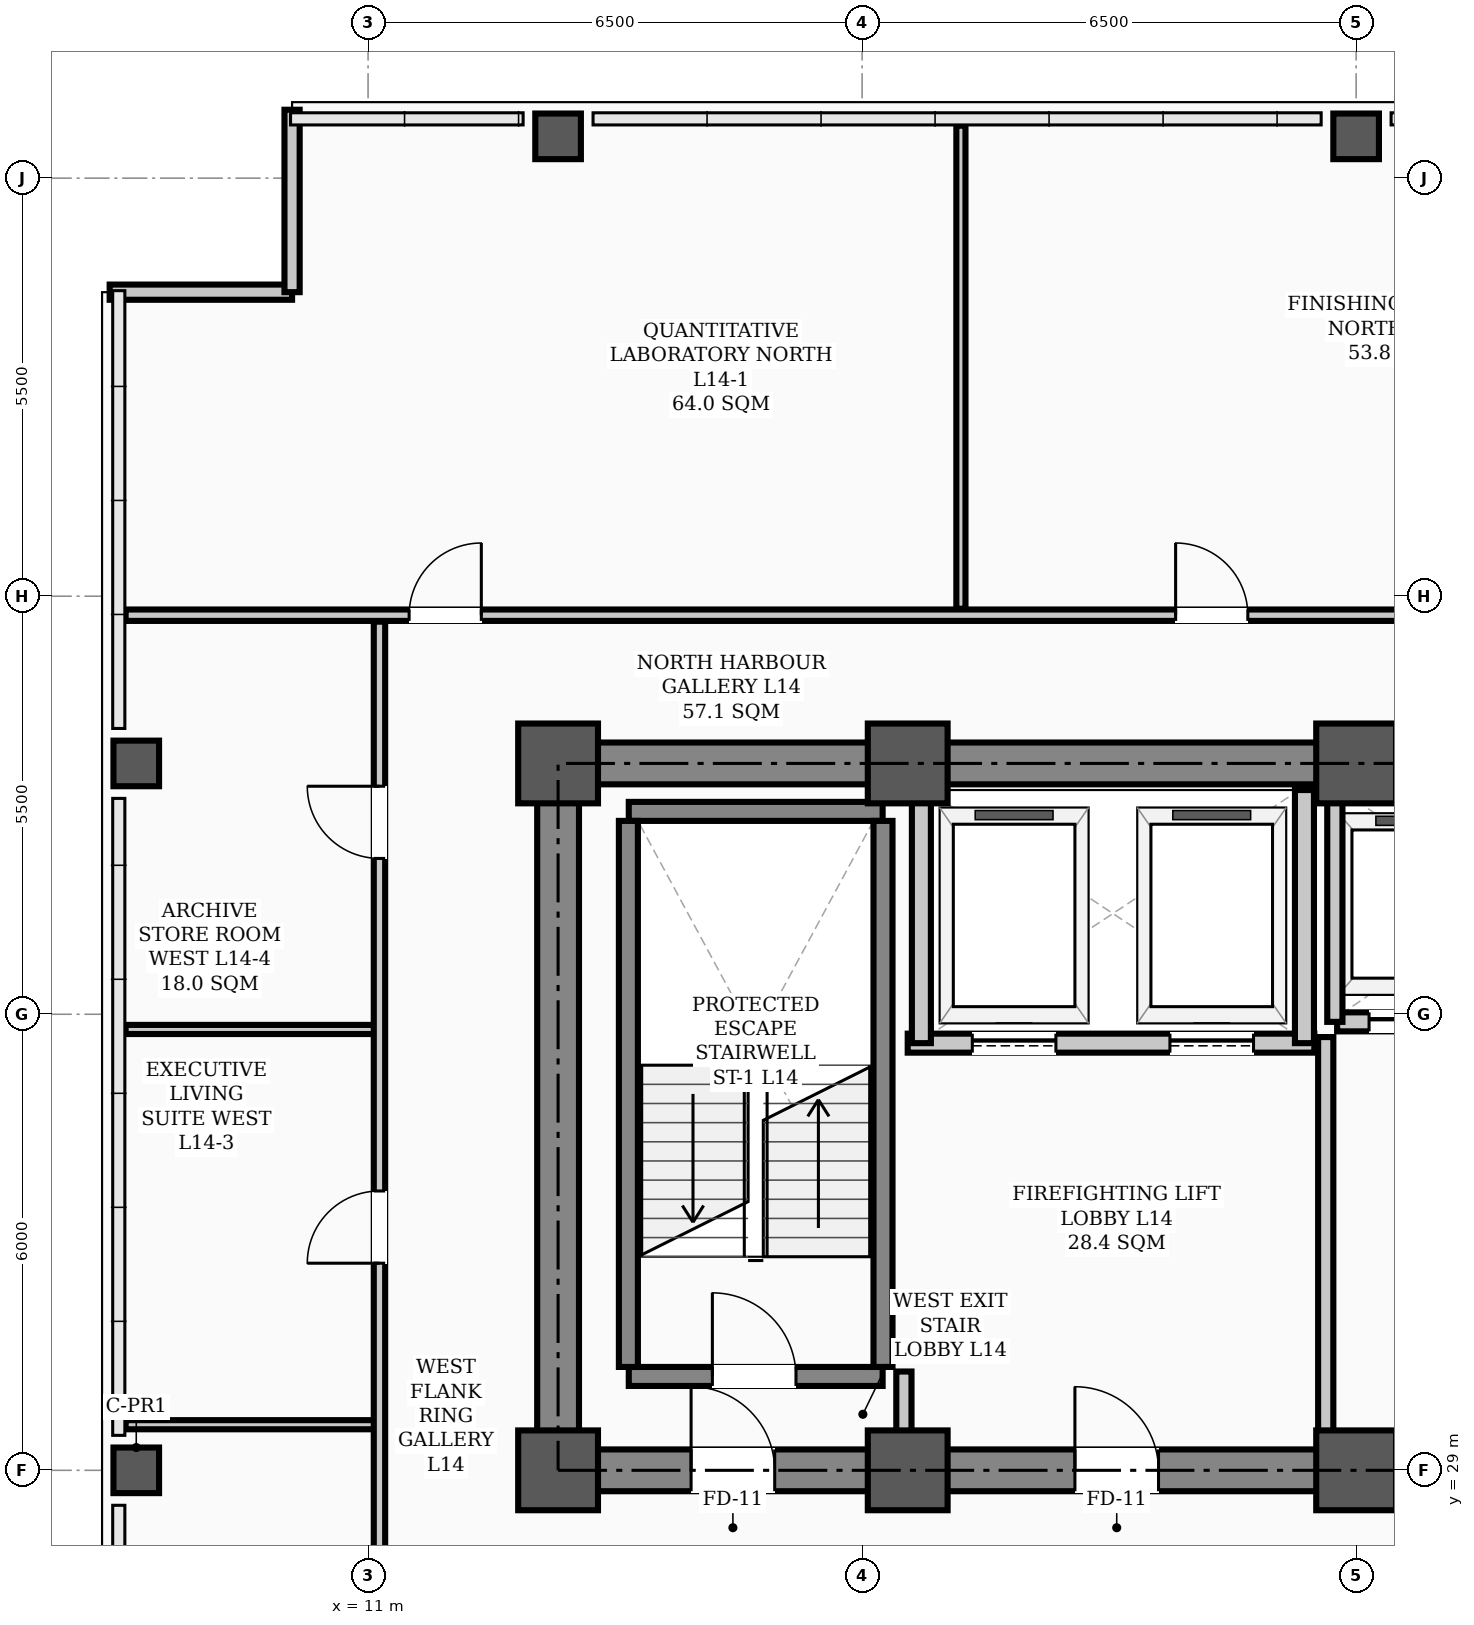
"""IFC4 building model, lengths in metres.
Left out: names, types, materials, properties, quantities, classifications, styles, units other than length and angle.
Written with IfcOpenShell. Run it as: python <this file> out.ifc"""

import sys

from ifc_helpers import new_model, si_unit, direction, frame, frame_2d, origin, origin_2d, place, context, subcontext, project, spatial, rectangle, hollow_rectangle, extrude, element, fill, save


model = new_model("IFC4")
c1 = context("Model", 3, precision=1e-05, world=origin(), true_north=direction((0.0, 1.0)))
c2 = subcontext(c1, "Body", "Model", "MODEL_VIEW")
j1 = project(units=[si_unit("LENGTHUNIT", "METRE"), si_unit("PLANEANGLEUNIT", "RADIAN")], contexts=[c1])
p1 = place(None, origin())
s1 = spatial("IfcSite", under=j1, at=p1, CompositionType="ELEMENT")
p2 = place(p1, origin())
s2 = spatial("IfcBuilding", under=s1, at=p2, CompositionType="ELEMENT")
p3 = place(p2, frame((0.0, 0.0, 57.7)))
s3 = spatial("IfcBuildingStorey", under=s2, at=p3, CompositionType="ELEMENT", Elevation=57.7)
for number, where, z_axis, x_axis in (
    (1, (13.5, 29.0, 0.0), (0.0, 0.0, 1.0), (1.0, 0.0, 0.0)),
    (2, (13.5, 38.3, 0.0), (0.0, 0.0, 1.0), (1.0, 0.0, 0.0)),
    (3, (18.1, 29.0, 0.0), (0.0, 0.0, 1.0), (1.0, 0.0, 0.0)),
    (4, (18.1, 38.3, 0.0), (0.0, 0.0, 1.0), (1.0, 0.0, 0.0)),
    (5, (24.0, 29.0, 0.0), (0.0, 0.0, 1.0), (1.0, 0.0, 0.0)),
    (6, (24.0, 38.3, 0.0), (0.0, 0.0, 1.0), (1.0, 0.0, 0.0)),
):
    element("IfcColumn", number, at=place(p3, frame(where, z_axis=z_axis, x_axis=x_axis)), inside=s3, PredefinedType="COLUMN", context=c2, shape_type="SweptSolid", body=[
        extrude(hollow_rectangle(XDim=1.05, YDim=1.05, WallThickness=0.038, InnerFilletRadius=0.019, OuterFilletRadius=0.057, at=origin_2d()), origin(), (0.0, 0.0, 1.0), 3.9),
    ])
for number, where, z_axis, x_axis in (
    (7, (7.95, 29.0, 0.0), (0.0, 0.0, 1.0), (1.0, 0.0, 0.0)),
    (8, (7.95, 38.3, 0.0), (0.0, 0.0, 1.0), (1.0, 0.0, 0.0)),
    (9, (13.5, 46.55, 0.0), (0.0, 0.0, 1.0), (1.0, 0.0, 0.0)),
    (10, (24.0, 46.55, 0.0), (0.0, 0.0, 1.0), (1.0, 0.0, 0.0)),
):
    element("IfcColumn", number, at=place(p3, frame(where, z_axis=z_axis, x_axis=x_axis)), inside=s3, PredefinedType="COLUMN", context=c2, shape_type="SweptSolid", body=[
        extrude(hollow_rectangle(XDim=0.6, YDim=0.6, WallThickness=0.026, InnerFilletRadius=0.013, OuterFilletRadius=0.039, at=origin_2d()), origin(), (0.0, 0.0, 1.0), 3.9),
    ])
for number, where, z_axis, x_axis in (
    (11, (7.6, 44.5, 0.0), (0.0, 0.0, 1.0), (1.0, 0.0, 0.0)),
    (12, (10.0, 44.5, 0.0), (0.0, 0.0, 1.0), (0.0, 1.0, 0.0)),
):
    element("IfcWall", number, at=place(p3, frame(where, z_axis=z_axis, x_axis=x_axis)), inside=s3, PredefinedType="PARAPET", context=c2, shape_type="SweptSolid", body=[
        extrude(rectangle(XDim=2.4, YDim=0.2, at=frame_2d((1.2, 0.0))), origin(), (0.0, 0.0, 1.0), 1.2),
    ])
p4 = place(p3, frame((13.5, 29.0, 0.0), z_axis=(0.0, 0.0, 1.0), x_axis=(1.0, 0.0, 0.0)))
e13 = element("IfcWall", 13, at=p4, inside=s3, PredefinedType="SHEAR", context=c2, shape_type="SweptSolid", body=[
    extrude(rectangle(XDim=30.5, YDim=0.55, at=frame_2d((15.25, 0.0))), origin(), (0.0, 0.0, 1.0), 3.72),
])
p5 = place(p4, frame((1.75, 0.0, 0.0)))
e14 = element("IfcOpeningElement", 14, at=p5, cuts=e13, PredefinedType="OPENING", context=c2, shape_type="SweptSolid", body=[
    extrude(rectangle(XDim=1.1, YDim=2.08, at=frame_2d((0.55, 1.04))), frame((0.0, 0.285, 0.0), z_axis=(0.0, -1.0, 0.0), x_axis=(1.0, 0.0, 0.0)), (0.0, 0.0, 1.0), 0.57),
])
p6 = place(p4, frame((26.7, 0.0, 0.0)))
e15 = element("IfcOpeningElement", 15, at=p6, cuts=e13, PredefinedType="OPENING", context=c2, shape_type="SweptSolid", body=[
    extrude(rectangle(XDim=1.1, YDim=2.08, at=frame_2d((0.55, 1.04))), frame((0.0, 0.285, 0.0), z_axis=(0.0, -1.0, 0.0), x_axis=(1.0, 0.0, 0.0)), (0.0, 0.0, 1.0), 0.57),
])
p7 = place(p4, frame((6.8, 0.0, 0.0)))
e16 = element("IfcOpeningElement", 16, at=p7, cuts=e13, PredefinedType="OPENING", context=c2, shape_type="SweptSolid", body=[
    extrude(rectangle(XDim=1.1, YDim=2.08, at=frame_2d((0.55, 1.04))), frame((0.0, 0.285, 0.0), z_axis=(0.0, -1.0, 0.0), x_axis=(1.0, 0.0, 0.0)), (0.0, 0.0, 1.0), 0.57),
])
p8 = place(p4, frame((13.2, 0.0, 0.0)))
e17 = element("IfcOpeningElement", 17, at=p8, cuts=e13, PredefinedType="OPENING", context=c2, shape_type="SweptSolid", body=[
    extrude(rectangle(XDim=1.6, YDim=2.08, at=frame_2d((0.8, 1.04))), frame((0.0, 0.285, 0.0), z_axis=(0.0, -1.0, 0.0), x_axis=(1.0, 0.0, 0.0)), (0.0, 0.0, 1.0), 0.57),
])
p9 = place(p4, frame((20.525, 0.0, 0.0)))
e18 = element("IfcOpeningElement", 18, at=p9, cuts=e13, PredefinedType="OPENING", context=c2, shape_type="SweptSolid", body=[
    extrude(rectangle(XDim=0.95, YDim=2.08, at=frame_2d((0.475, 1.04))), frame((0.0, 0.285, 0.0), z_axis=(0.0, -1.0, 0.0), x_axis=(1.0, 0.0, 0.0)), (0.0, 0.0, 1.0), 0.57),
])
p10 = place(p3, frame((13.5, 38.3, 0.0), z_axis=(0.0, 0.0, 1.0), x_axis=(1.0, 0.0, 0.0)))
e19 = element("IfcWall", 19, at=p10, inside=s3, PredefinedType="SHEAR", context=c2, shape_type="SweptSolid", body=[
    extrude(rectangle(XDim=30.5, YDim=0.55, at=frame_2d((15.25, 0.0))), origin(), (0.0, 0.0, 1.0), 3.72),
])
p11 = place(p3, frame((13.5, 29.35, 0.0), z_axis=(0.0, 0.0, 1.0), x_axis=(0.0, 1.0, 0.0)))
e20 = element("IfcWall", 20, at=p11, inside=s3, PredefinedType="SHEAR", context=c2, shape_type="SweptSolid", body=[
    extrude(rectangle(XDim=8.6, YDim=0.55, at=frame_2d((4.3, 0.0))), origin(), (0.0, 0.0, 1.0), 3.72),
])
p12 = place(p3, frame((14.43, 30.235, 0.0), z_axis=(0.0, 0.0, 1.0), x_axis=(1.0, 0.0, 0.0)))
e21 = element("IfcWall", 21, at=p12, inside=s3, PredefinedType="STANDARD", context=c2, shape_type="SweptSolid", body=[
    extrude(rectangle(XDim=3.34, YDim=0.25, at=frame_2d((1.67, 0.0))), origin(), (0.0, 0.0, 1.0), 3.72),
])
p13 = place(p12, frame((1.1, 0.0, 0.0)))
e22 = element("IfcOpeningElement", 22, at=p13, cuts=e21, PredefinedType="OPENING", context=c2, shape_type="SweptSolid", body=[
    extrude(rectangle(XDim=1.1, YDim=2.08, at=frame_2d((0.55, 1.04))), frame((0.0, 0.135, 0.0), z_axis=(0.0, -1.0, 0.0), x_axis=(1.0, 0.0, 0.0)), (0.0, 0.0, 1.0), 0.27),
])
p14 = place(p3, frame((14.43, 37.669, 0.0), z_axis=(0.0, 0.0, 1.0), x_axis=(1.0, 0.0, 0.0)))
e23 = element("IfcWall", 23, at=p14, inside=s3, PredefinedType="STANDARD", context=c2, shape_type="SweptSolid", body=[
    extrude(rectangle(XDim=3.34, YDim=0.25, at=frame_2d((1.67, 0.0))), origin(), (0.0, 0.0, 1.0), 3.72),
])
for number, where, z_axis, x_axis in (
    (24, (14.425, 30.36, 0.0), (0.0, 0.0, 1.0), (0.0, 1.0, 0.0)),
    (25, (17.775, 30.36, 0.0), (0.0, 0.0, 1.0), (0.0, 1.0, 0.0)),
):
    element("IfcWall", number, at=place(p3, frame(where, z_axis=z_axis, x_axis=x_axis)), inside=s3, PredefinedType="STANDARD", context=c2, shape_type="SweptSolid", body=[
        extrude(rectangle(XDim=7.184, YDim=0.25, at=frame_2d((3.592, 0.0))), origin(), (0.0, 0.0, 1.0), 3.72),
    ])
p15 = place(p3, frame((18.1, 34.62, 0.0), z_axis=(0.0, 0.0, 1.0), x_axis=(1.0, 0.0, 0.0)))
e26 = element("IfcWall", 26, at=p15, inside=s3, PredefinedType="STANDARD", context=c2, shape_type="SweptSolid", body=[
    extrude(rectangle(XDim=5.35, YDim=0.25, at=frame_2d((2.675, 0.0))), origin(), (0.0, 0.0, 1.0), 3.72),
])
p16 = place(p15, frame((0.85, 0.0, 0.0)))
e27 = element("IfcOpeningElement", 27, at=p16, cuts=e26, PredefinedType="OPENING", context=c2, shape_type="SweptSolid", body=[
    extrude(rectangle(XDim=1.1, YDim=2.08, at=frame_2d((0.55, 1.04))), frame((0.0, 0.135, 0.0), z_axis=(0.0, -1.0, 0.0), x_axis=(1.0, 0.0, 0.0)), (0.0, 0.0, 1.0), 0.27),
])
p17 = place(p15, frame((3.45, 0.0, 0.0)))
e28 = element("IfcOpeningElement", 28, at=p17, cuts=e26, PredefinedType="OPENING", context=c2, shape_type="SweptSolid", body=[
    extrude(rectangle(XDim=1.1, YDim=2.08, at=frame_2d((0.55, 1.04))), frame((0.0, 0.135, 0.0), z_axis=(0.0, -1.0, 0.0), x_axis=(1.0, 0.0, 0.0)), (0.0, 0.0, 1.0), 0.27),
])
for number, where, z_axis, x_axis in (
    (29, (18.28, 34.62, 0.0), (0.0, 0.0, 1.0), (0.0, 1.0, 0.0)),
    (30, (23.32, 34.62, 0.0), (0.0, 0.0, 1.0), (0.0, 1.0, 0.0)),
):
    element("IfcWall", number, at=place(p3, frame(where, z_axis=z_axis, x_axis=x_axis)), inside=s3, PredefinedType="STANDARD", context=c2, shape_type="SweptSolid", body=[
        extrude(rectangle(XDim=3.33, YDim=0.25, at=frame_2d((1.665, 0.0))), origin(), (0.0, 0.0, 1.0), 3.3),
    ])
p18 = place(p3, frame((23.75, 34.9, 0.0), z_axis=(0.0, 0.0, 1.0), x_axis=(1.0, 0.0, 0.0)))
e31 = element("IfcWall", 31, at=p18, inside=s3, PredefinedType="STANDARD", context=c2, shape_type="SweptSolid", body=[
    extrude(rectangle(XDim=4.4, YDim=0.25, at=frame_2d((2.2, 0.0))), origin(), (0.0, 0.0, 1.0), 3.72),
])
p19 = place(p18, frame((0.42, 0.0, 0.0)))
e32 = element("IfcOpeningElement", 32, at=p19, cuts=e31, PredefinedType="OPENING", context=c2, shape_type="SweptSolid", body=[
    extrude(rectangle(XDim=1.3, YDim=2.08, at=frame_2d((0.65, 1.04))), frame((0.0, 0.135, 0.0), z_axis=(0.0, -1.0, 0.0), x_axis=(1.0, 0.0, 0.0)), (0.0, 0.0, 1.0), 0.27),
])
p20 = place(p18, frame((2.68, 0.0, 0.0)))
e33 = element("IfcOpeningElement", 33, at=p20, cuts=e31, PredefinedType="OPENING", context=c2, shape_type="SweptSolid", body=[
    extrude(rectangle(XDim=1.3, YDim=2.08, at=frame_2d((0.65, 1.04))), frame((0.0, 0.135, 0.0), z_axis=(0.0, -1.0, 0.0), x_axis=(1.0, 0.0, 0.0)), (0.0, 0.0, 1.0), 0.27),
])
p21 = place(p3, frame((7.81, 29.6, 0.0), z_axis=(0.0, 0.0, 1.0), x_axis=(1.0, 0.0, 0.0)))
e34 = element("IfcWall", 34, at=p21, inside=s3, PredefinedType="PARTITIONING", context=c2, shape_type="SweptSolid", body=[
    extrude(rectangle(XDim=3.34, YDim=0.12, at=frame_2d((1.67, 0.0))), origin(), (0.0, 0.0, 1.0), 3.0),
])
p22 = place(p3, frame((7.81, 34.8, 0.0), z_axis=(0.0, 0.0, 1.0), x_axis=(1.0, 0.0, 0.0)))
e35 = element("IfcWall", 35, at=p22, inside=s3, PredefinedType="PARTITIONING", context=c2, shape_type="SweptSolid", body=[
    extrude(rectangle(XDim=3.34, YDim=0.12, at=frame_2d((1.67, 0.0))), origin(), (0.0, 0.0, 1.0), 3.212),
])
p23 = place(p3, frame((7.81, 40.25, 0.0), z_axis=(0.0, 0.0, 1.0), x_axis=(1.0, 0.0, 0.0)))
e36 = element("IfcWall", 36, at=p23, inside=s3, PredefinedType="PARTITIONING", context=c2, shape_type="SweptSolid", body=[
    extrude(rectangle(XDim=49.38, YDim=0.15, at=frame_2d((24.69, 0.0))), origin(), (0.0, 0.0, 1.0), 3.1),
])
p24 = place(p23, frame((3.73, 0.0, 0.0)))
e37 = element("IfcOpeningElement", 37, at=p24, cuts=e36, PredefinedType="OPENING", context=c2, shape_type="SweptSolid", body=[
    extrude(rectangle(XDim=0.95, YDim=2.08, at=frame_2d((0.475, 1.04))), frame((0.0, 0.085, 0.0), z_axis=(0.0, -1.0, 0.0), x_axis=(1.0, 0.0, 0.0)), (0.0, 0.0, 1.0), 0.17),
])
p25 = place(p23, frame((13.815, 0.0, 0.0)))
e38 = element("IfcOpeningElement", 38, at=p25, cuts=e36, PredefinedType="OPENING", context=c2, shape_type="SweptSolid", body=[
    extrude(rectangle(XDim=0.95, YDim=2.08, at=frame_2d((0.475, 1.04))), frame((0.0, 0.085, 0.0), z_axis=(0.0, -1.0, 0.0), x_axis=(1.0, 0.0, 0.0)), (0.0, 0.0, 1.0), 0.17),
])
p26 = place(p23, frame((19.965, 0.0, 0.0)))
e39 = element("IfcOpeningElement", 39, at=p26, cuts=e36, PredefinedType="OPENING", context=c2, shape_type="SweptSolid", body=[
    extrude(rectangle(XDim=0.95, YDim=2.08, at=frame_2d((0.475, 1.04))), frame((0.0, 0.085, 0.0), z_axis=(0.0, -1.0, 0.0), x_axis=(1.0, 0.0, 0.0)), (0.0, 0.0, 1.0), 0.17),
])
p27 = place(p23, frame((30.815, 0.0, 0.0)))
e40 = element("IfcOpeningElement", 40, at=p27, cuts=e36, PredefinedType="OPENING", context=c2, shape_type="SweptSolid", body=[
    extrude(rectangle(XDim=0.95, YDim=2.08, at=frame_2d((0.475, 1.04))), frame((0.0, 0.085, 0.0), z_axis=(0.0, -1.0, 0.0), x_axis=(1.0, 0.0, 0.0)), (0.0, 0.0, 1.0), 0.17),
])
p28 = place(p23, frame((37.2, 0.0, 0.0)))
e41 = element("IfcOpeningElement", 41, at=p28, cuts=e36, PredefinedType="OPENING", context=c2, shape_type="SweptSolid", body=[
    extrude(rectangle(XDim=0.95, YDim=2.08, at=frame_2d((0.475, 1.04))), frame((0.0, 0.085, 0.0), z_axis=(0.0, -1.0, 0.0), x_axis=(1.0, 0.0, 0.0)), (0.0, 0.0, 1.0), 0.17),
])
p29 = place(p3, frame((18.05, 29.285, 0.0), z_axis=(0.0, 0.0, 1.0), x_axis=(0.0, 1.0, 0.0)))
e42 = element("IfcWall", 42, at=p29, inside=s3, PredefinedType="STANDARD", context=c2, shape_type="SweptSolid", body=[
    extrude(rectangle(XDim=1.015, YDim=0.2, at=frame_2d((0.508, 0.0))), origin(), (0.0, 0.0, 1.0), 3.3),
])
p30 = place(p3, frame((23.6, 29.285, 0.0), z_axis=(0.0, 0.0, 1.0), x_axis=(0.0, 1.0, 0.0)))
e43 = element("IfcWall", 43, at=p30, inside=s3, PredefinedType="STANDARD", context=c2, shape_type="SweptSolid", body=[
    extrude(rectangle(XDim=5.415, YDim=0.2, at=frame_2d((2.708, 0.0))), origin(), (0.0, 0.0, 1.0), 3.1),
])
p31 = place(p3, frame((11.15, 17.635, 0.0), z_axis=(0.0, 0.0, 1.0), x_axis=(0.0, 1.0, 0.0)))
e44 = element("IfcWall", 44, at=p31, inside=s3, PredefinedType="PARTITIONING", context=c2, shape_type="SweptSolid", body=[
    extrude(rectangle(XDim=22.53, YDim=0.15, at=frame_2d((11.265, 0.0))), origin(), (0.0, 0.0, 1.0), 3.0),
])
p32 = place(p31, frame((3.065, 0.0, 0.0)))
e45 = element("IfcOpeningElement", 45, at=p32, cuts=e44, PredefinedType="OPENING", context=c2, shape_type="SweptSolid", body=[
    extrude(rectangle(XDim=0.95, YDim=2.08, at=frame_2d((0.475, 1.04))), frame((0.0, 0.085, 0.0), z_axis=(0.0, -1.0, 0.0), x_axis=(1.0, 0.0, 0.0)), (0.0, 0.0, 1.0), 0.17),
])
p33 = place(p31, frame((9.09, 0.0, 0.0)))
e46 = element("IfcOpeningElement", 46, at=p33, cuts=e44, PredefinedType="OPENING", context=c2, shape_type="SweptSolid", body=[
    extrude(rectangle(XDim=0.95, YDim=2.08, at=frame_2d((0.475, 1.04))), frame((0.0, 0.085, 0.0), z_axis=(0.0, -1.0, 0.0), x_axis=(1.0, 0.0, 0.0)), (0.0, 0.0, 1.0), 0.17),
])
p34 = place(p31, frame((14.09, 0.0, 0.0)))
e47 = element("IfcOpeningElement", 47, at=p34, cuts=e44, PredefinedType="OPENING", context=c2, shape_type="SweptSolid", body=[
    extrude(rectangle(XDim=0.95, YDim=2.08, at=frame_2d((0.475, 1.04))), frame((0.0, 0.085, 0.0), z_axis=(0.0, -1.0, 0.0), x_axis=(1.0, 0.0, 0.0)), (0.0, 0.0, 1.0), 0.17),
])
p35 = place(p31, frame((19.415, 0.0, 0.0)))
e48 = element("IfcOpeningElement", 48, at=p35, cuts=e44, PredefinedType="OPENING", context=c2, shape_type="SweptSolid", body=[
    extrude(rectangle(XDim=0.95, YDim=2.08, at=frame_2d((0.475, 1.04))), frame((0.0, 0.085, 0.0), z_axis=(0.0, -1.0, 0.0), x_axis=(1.0, 0.0, 0.0)), (0.0, 0.0, 1.0), 0.17),
])
p36 = place(p3, frame((18.8, 40.335, 0.0), z_axis=(0.0, 0.0, 1.0), x_axis=(0.0, 1.0, 0.0)))
e49 = element("IfcWall", 49, at=p36, inside=s3, PredefinedType="PARTITIONING", context=c2, shape_type="SweptSolid", body=[
    extrude(rectangle(XDim=6.355, YDim=0.12, at=frame_2d((3.177, 0.0))), origin(), (0.0, 0.0, 1.0), 3.212),
])
p37 = place(p3, frame((23.72, 34.9, 0.0), z_axis=(0.0, 0.0, 1.0), x_axis=(0.0, 1.0, 0.0)))
e50 = element("IfcWall", 50, at=p37, inside=s3, PredefinedType="STANDARD", context=c2, shape_type="SweptSolid", body=[
    extrude(rectangle(XDim=3.12, YDim=0.2, at=frame_2d((1.56, 0.0))), origin(), (0.0, 0.0, 1.0), 3.1),
])
p38 = place(p13, origin())
e51 = element("IfcDoor", 51, at=p38, inside=s3, OperationType="SINGLE_SWING_LEFT", PredefinedType="DOOR", context=c2, shape_type="SweptSolid", body=[
    extrude(rectangle(XDim=1.1, YDim=2.08, at=frame_2d((0.55, 1.04))), frame((0.0, 0.025, 0.0), z_axis=(0.0, -1.0, 0.0), x_axis=(1.0, 0.0, 0.0)), (0.0, 0.0, 1.0), 0.05),
])
fill(e22, e51)
p39 = place(p5, origin())
e52 = element("IfcDoor", 52, at=p39, inside=s3, OperationType="SINGLE_SWING_LEFT", PredefinedType="DOOR", context=c2, shape_type="SweptSolid", body=[
    extrude(rectangle(XDim=1.1, YDim=2.08, at=frame_2d((0.55, 1.04))), frame((0.0, 0.025, 0.0), z_axis=(0.0, -1.0, 0.0), x_axis=(1.0, 0.0, 0.0)), (0.0, 0.0, 1.0), 0.05),
])
fill(e14, e52)
p40 = place(p7, origin())
e53 = element("IfcDoor", 53, at=p40, inside=s3, OperationType="SINGLE_SWING_LEFT", PredefinedType="DOOR", context=c2, shape_type="SweptSolid", body=[
    extrude(rectangle(XDim=1.1, YDim=2.08, at=frame_2d((0.55, 1.04))), frame((0.0, 0.025, 0.0), z_axis=(0.0, -1.0, 0.0), x_axis=(1.0, 0.0, 0.0)), (0.0, 0.0, 1.0), 0.05),
])
fill(e16, e53)
p41 = place(p34, origin())
e54 = element("IfcDoor", 54, at=p41, inside=s3, OperationType="SINGLE_SWING_LEFT", PredefinedType="DOOR", context=c2, shape_type="SweptSolid", body=[
    extrude(rectangle(XDim=0.95, YDim=2.08, at=frame_2d((0.475, 1.04))), frame((0.0, 0.025, 0.0), z_axis=(0.0, -1.0, 0.0), x_axis=(1.0, 0.0, 0.0)), (0.0, 0.0, 1.0), 0.05),
])
fill(e47, e54)
p42 = place(p35, origin())
e55 = element("IfcDoor", 55, at=p42, inside=s3, OperationType="SINGLE_SWING_RIGHT", PredefinedType="DOOR", context=c2, shape_type="SweptSolid", body=[
    extrude(rectangle(XDim=0.95, YDim=2.08, at=frame_2d((0.475, 1.04))), frame((0.0, 0.025, 0.0), z_axis=(0.0, -1.0, 0.0), x_axis=(1.0, 0.0, 0.0)), (0.0, 0.0, 1.0), 0.05),
])
fill(e48, e55)
p43 = place(p24, origin())
e56 = element("IfcDoor", 56, at=p43, inside=s3, OperationType="SINGLE_SWING_RIGHT", PredefinedType="DOOR", context=c2, shape_type="SweptSolid", body=[
    extrude(rectangle(XDim=0.95, YDim=2.08, at=frame_2d((0.475, 1.04))), frame((0.0, 0.025, 0.0), z_axis=(0.0, -1.0, 0.0), x_axis=(1.0, 0.0, 0.0)), (0.0, 0.0, 1.0), 0.05),
])
fill(e37, e56)
p44 = place(p25, origin())
e57 = element("IfcDoor", 57, at=p44, inside=s3, OperationType="SINGLE_SWING_LEFT", PredefinedType="DOOR", context=c2, shape_type="SweptSolid", body=[
    extrude(rectangle(XDim=0.95, YDim=2.08, at=frame_2d((0.475, 1.04))), frame((0.0, 0.025, 0.0), z_axis=(0.0, -1.0, 0.0), x_axis=(1.0, 0.0, 0.0)), (0.0, 0.0, 1.0), 0.05),
])
fill(e38, e57)
p45 = place(p16, origin())
e58 = element("IfcDoor", 58, at=p45, inside=s3, OperationType="SLIDING_TO_LEFT", PredefinedType="DOOR", context=c2, shape_type="SweptSolid", body=[
    extrude(rectangle(XDim=1.1, YDim=2.08, at=frame_2d((0.55, 1.04))), frame((0.0, 0.025, 0.0), z_axis=(0.0, -1.0, 0.0), x_axis=(1.0, 0.0, 0.0)), (0.0, 0.0, 1.0), 0.05),
])
fill(e27, e58)
p46 = place(p17, origin())
e59 = element("IfcDoor", 59, at=p46, inside=s3, OperationType="SLIDING_TO_LEFT", PredefinedType="DOOR", context=c2, shape_type="SweptSolid", body=[
    extrude(rectangle(XDim=1.1, YDim=2.08, at=frame_2d((0.55, 1.04))), frame((0.0, 0.025, 0.0), z_axis=(0.0, -1.0, 0.0), x_axis=(1.0, 0.0, 0.0)), (0.0, 0.0, 1.0), 0.05),
])
fill(e28, e59)
p47 = place(p19, origin())
e60 = element("IfcDoor", 60, at=p47, inside=s3, OperationType="DOUBLE_DOOR_SLIDING", PredefinedType="DOOR", context=c2, shape_type="SweptSolid", body=[
    extrude(rectangle(XDim=1.3, YDim=2.08, at=frame_2d((0.65, 1.04))), frame((0.0, 0.025, 0.0), z_axis=(0.0, -1.0, 0.0), x_axis=(1.0, 0.0, 0.0)), (0.0, 0.0, 1.0), 0.05),
])
fill(e32, e60)
save(model, sys.argv[1])
